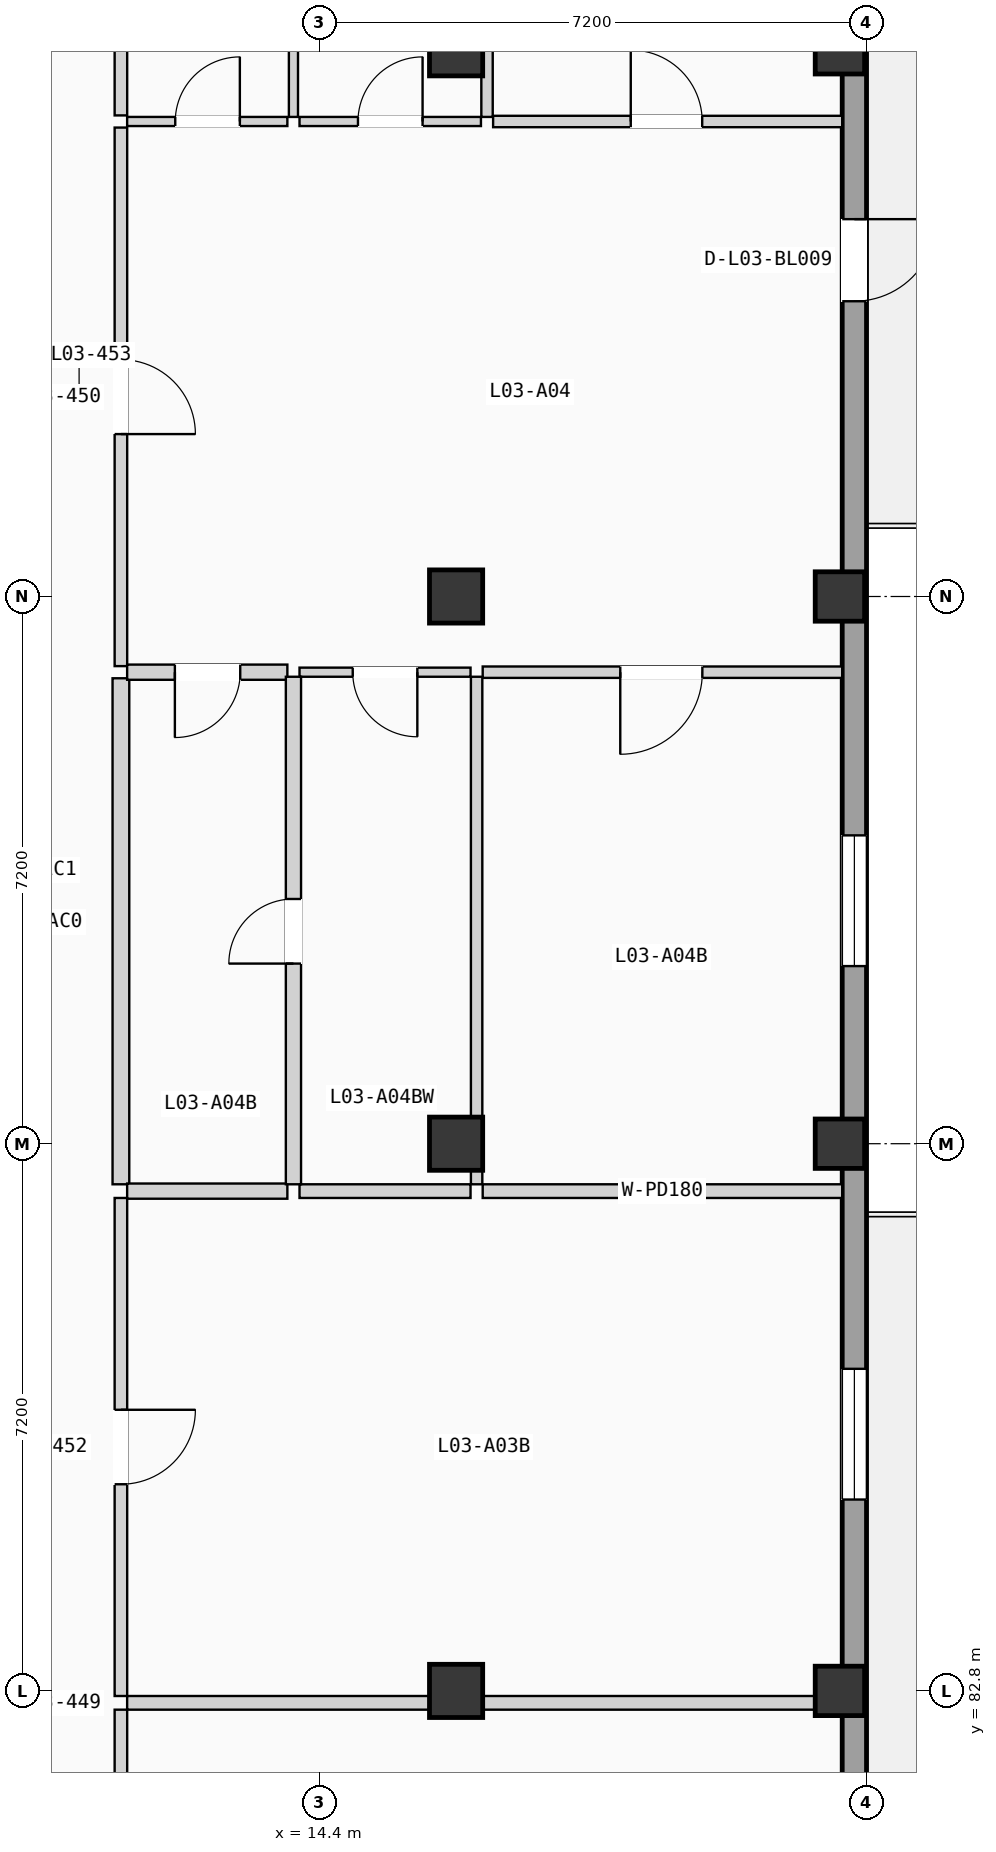
"""IFC4 building model, lengths in metres.
Left out: names, types, materials, properties, quantities, classifications, styles, units other than length and angle.
Written with IfcOpenShell. Run it as: python <this file> out.ifc"""

import sys

from ifc_helpers import new_model, si_unit, direction, frame, frame_2d, origin, origin_2d, place, context, subcontext, project, spatial, rectangle, extrude, element, fill, save


model = new_model("IFC4")
c1 = context("Model", 3, precision=1e-05, world=origin(), true_north=direction((0.0, 1.0)))
c2 = subcontext(c1, "Body", "Model", "MODEL_VIEW")
j1 = project(units=[si_unit("LENGTHUNIT", "METRE"), si_unit("PLANEANGLEUNIT", "RADIAN")], contexts=[c1])
p1 = place(None, origin())
s1 = spatial("IfcSite", under=j1, at=p1, CompositionType="ELEMENT")
p2 = place(p1, origin())
s2 = spatial("IfcBuilding", under=s1, at=p2, CompositionType="ELEMENT")
p3 = place(p2, frame((0.0, 0.0, 12.075)))
s3 = spatial("IfcBuildingStorey", under=s2, at=p3, CompositionType="ELEMENT", Elevation=12.075)
for number, where, z_axis, x_axis in (
    (1, (16.2, 82.8, 0.0), (0.0, 0.0, 1.0), (1.0, 0.0, 0.0)),
    (2, (16.2, 90.0, 0.0), (0.0, 0.0, 1.0), (1.0, 0.0, 0.0)),
    (3, (16.2, 97.2, 0.0), (0.0, 0.0, 1.0), (1.0, 0.0, 0.0)),
    (4, (16.2, 104.4, 0.0), (0.0, 0.0, 1.0), (1.0, 0.0, 0.0)),
):
    element("IfcColumn", number, at=place(p3, frame(where, z_axis=z_axis, x_axis=x_axis)), inside=s3, PredefinedType="COLUMN", context=c2, shape_type="SweptSolid", body=[
        extrude(rectangle(XDim=0.7, YDim=0.7, at=origin_2d()), origin(), (0.0, 0.0, 1.0), 3.15),
    ])
for number, where, z_axis, x_axis in (
    (5, (21.25, 82.8, 0.0), (0.0, 0.0, 1.0), (1.0, 0.0, 0.0)),
    (6, (21.25, 90.0, 0.0), (0.0, 0.0, 1.0), (1.0, 0.0, 0.0)),
    (7, (21.25, 97.2, 0.0), (0.0, 0.0, 1.0), (1.0, 0.0, 0.0)),
    (8, (21.25, 104.4, 0.0), (0.0, 0.0, 1.0), (1.0, 0.0, 0.0)),
):
    element("IfcColumn", number, at=place(p3, frame(where, z_axis=z_axis, x_axis=x_axis)), inside=s3, PredefinedType="COLUMN", context=c2, shape_type="SweptSolid", body=[
        extrude(rectangle(XDim=0.65, YDim=0.65, at=origin_2d()), origin(), (0.0, 0.0, 1.0), 3.15),
    ])
p4 = place(p3, frame((21.44, 68.72, 0.0), z_axis=(0.0, 0.0, 1.0), x_axis=(0.0, 1.0, 0.0)))
e9 = element("IfcWall", 9, at=p4, inside=s3, PredefinedType="SOLIDWALL", context=c2, shape_type="SweptSolid", body=[
    extrude(rectangle(XDim=49.76, YDim=0.32, at=frame_2d((24.88, 0.0))), origin(), (0.0, 0.0, 1.0), 2.89),
])
p5 = place(p4, frame((10.83, 0.0, 0.0)))
e10 = element("IfcOpeningElement", 10, at=p5, cuts=e9, PredefinedType="OPENING", context=c2, shape_type="SweptSolid", body=[
    extrude(rectangle(XDim=0.95, YDim=2.15, at=frame_2d((0.475, 1.075))), frame((0.0, 0.17, 0.0), z_axis=(0.0, -1.0, 0.0), x_axis=(1.0, 0.0, 0.0)), (0.0, 0.0, 1.0), 0.34),
])
p6 = place(p4, frame((16.598, 0.0, 0.9)))
e11 = element("IfcOpeningElement", 11, at=p6, cuts=e9, PredefinedType="OPENING", context=c2, shape_type="SweptSolid", body=[
    extrude(rectangle(XDim=1.72, YDim=1.2, at=frame_2d((0.86, 0.6))), frame((0.0, 0.17, 0.0), z_axis=(0.0, -1.0, 0.0), x_axis=(1.0, 0.0, 0.0)), (0.0, 0.0, 1.0), 0.34),
])
p7 = place(p4, frame((32.365, 0.0, 0.0)))
e12 = element("IfcOpeningElement", 12, at=p7, cuts=e9, PredefinedType="OPENING", context=c2, shape_type="SweptSolid", body=[
    extrude(rectangle(XDim=1.08, YDim=2.18, at=frame_2d((0.54, 1.09))), frame((0.0, 0.17, 0.0), z_axis=(0.0, -1.0, 0.0), x_axis=(1.0, 0.0, 0.0)), (0.0, 0.0, 1.0), 0.34),
])
p8 = place(p4, frame((23.617, 0.0, 0.855)))
e13 = element("IfcOpeningElement", 13, at=p8, cuts=e9, PredefinedType="OPENING", context=c2, shape_type="SweptSolid", body=[
    extrude(rectangle(XDim=1.72, YDim=1.35, at=frame_2d((0.86, 0.675))), frame((0.0, 0.17, 0.0), z_axis=(0.0, -1.0, 0.0), x_axis=(1.0, 0.0, 0.0)), (0.0, 0.0, 1.0), 0.34),
])
p9 = place(p4, frame((38.355, 0.0, 0.705)))
e14 = element("IfcOpeningElement", 14, at=p9, cuts=e9, PredefinedType="OPENING", context=c2, shape_type="SweptSolid", body=[
    extrude(rectangle(XDim=1.72, YDim=1.5, at=frame_2d((0.86, 0.75))), frame((0.0, 0.17, 0.0), z_axis=(0.0, -1.0, 0.0), x_axis=(1.0, 0.0, 0.0)), (0.0, 0.0, 1.0), 0.34),
])
p10 = place(p3, frame((11.79, 75.945, 0.0), z_axis=(0.0, 0.0, 1.0), x_axis=(0.0, 1.0, 0.0)))
e15 = element("IfcWall", 15, at=p10, inside=s3, PredefinedType="PARTITIONING", context=c2, shape_type="SweptSolid", body=[
    extrude(rectangle(XDim=6.608, YDim=0.165, at=frame_2d((3.304, 0.0))), origin(), (0.0, 0.0, 1.0), 2.87),
])
p11 = place(p10, frame((2.842, 0.0, 0.0)))
e16 = element("IfcOpeningElement", 16, at=p11, cuts=e15, PredefinedType="OPENING", context=c2, shape_type="SweptSolid", body=[
    extrude(rectangle(XDim=0.98, YDim=2.08, at=frame_2d((0.49, 1.04))), frame((0.0, 0.093, 0.0), z_axis=(0.0, -1.0, 0.0), x_axis=(1.0, 0.0, 0.0)), (0.0, 0.0, 1.0), 0.185),
])
p12 = place(p3, frame((11.79, 82.733, 0.0), z_axis=(0.0, 0.0, 1.0), x_axis=(0.0, 1.0, 0.0)))
e17 = element("IfcWall", 17, at=p12, inside=s3, PredefinedType="PARTITIONING", context=c2, shape_type="SweptSolid", body=[
    extrude(rectangle(XDim=6.553, YDim=0.165, at=frame_2d((3.276, 0.0))), origin(), (0.0, 0.0, 1.0), 2.87),
])
p13 = place(p12, frame((2.786, 0.0, 0.0)))
e18 = element("IfcOpeningElement", 18, at=p13, cuts=e17, PredefinedType="OPENING", context=c2, shape_type="SweptSolid", body=[
    extrude(rectangle(XDim=0.98, YDim=2.08, at=frame_2d((0.49, 1.04))), frame((0.0, 0.093, 0.0), z_axis=(0.0, -1.0, 0.0), x_axis=(1.0, 0.0, 0.0)), (0.0, 0.0, 1.0), 0.185),
])
p14 = place(p3, frame((11.79, 96.284, 0.0), z_axis=(0.0, 0.0, 1.0), x_axis=(0.0, 1.0, 0.0)))
e19 = element("IfcWall", 19, at=p14, inside=s3, PredefinedType="PARTITIONING", context=c2, shape_type="SweptSolid", body=[
    extrude(rectangle(XDim=7.086, YDim=0.165, at=frame_2d((3.543, 0.0))), origin(), (0.0, 0.0, 1.0), 2.87),
])
p15 = place(p14, frame((3.053, 0.0, 0.0)))
e20 = element("IfcOpeningElement", 20, at=p15, cuts=e19, PredefinedType="OPENING", context=c2, shape_type="SweptSolid", body=[
    extrude(rectangle(XDim=0.98, YDim=2.08, at=frame_2d((0.49, 1.04))), frame((0.0, 0.093, 0.0), z_axis=(0.0, -1.0, 0.0), x_axis=(1.0, 0.0, 0.0)), (0.0, 0.0, 1.0), 0.185),
])
p16 = place(p3, frame((11.79, 89.466, 0.0), z_axis=(0.0, 0.0, 1.0), x_axis=(0.0, 1.0, 0.0)))
e21 = element("IfcWall", 21, at=p16, inside=s3, PredefinedType="PLUMBINGWALL", context=c2, shape_type="SweptSolid", body=[
    extrude(rectangle(XDim=6.658, YDim=0.22, at=frame_2d((3.329, 0.0))), origin(), (0.0, 0.0, 1.0), 2.87),
])
p17 = place(p3, frame((11.79, 103.53, 0.0), z_axis=(0.0, 0.0, 1.0), x_axis=(0.0, 1.0, 0.0)))
e22 = element("IfcWall", 22, at=p17, inside=s3, PredefinedType="PARTITIONING", context=c2, shape_type="SweptSolid", body=[
    extrude(rectangle(XDim=7.67, YDim=0.165, at=frame_2d((3.835, 0.0))), origin(), (0.0, 0.0, 1.0), 2.87),
])
p18 = place(p3, frame((11.872, 82.643, 0.0), z_axis=(0.0, 0.0, 1.0), x_axis=(1.0, 0.0, 0.0)))
e23 = element("IfcWall", 23, at=p18, inside=s3, PredefinedType="PARTITIONING", context=c2, shape_type="SweptSolid", body=[
    extrude(rectangle(XDim=9.408, YDim=0.18, at=frame_2d((4.704, 0.0))), origin(), (0.0, 0.0, 1.0), 2.16),
])
p19 = place(p3, frame((11.872, 89.376, 0.0), z_axis=(0.0, 0.0, 1.0), x_axis=(1.0, 0.0, 0.0)))
e24 = element("IfcWall", 24, at=p19, inside=s3, PredefinedType="PLUMBINGWALL", context=c2, shape_type="SweptSolid", body=[
    extrude(rectangle(XDim=2.108, YDim=0.2, at=frame_2d((1.054, 0.0))), origin(), (0.0, 0.0, 1.0), 2.87),
])
p20 = place(p3, frame((16.55, 89.376, 0.0), z_axis=(0.0, 0.0, 1.0), x_axis=(1.0, 0.0, 0.0)))
e25 = element("IfcWall", 25, at=p20, inside=s3, PredefinedType="PARTITIONING", context=c2, shape_type="SweptSolid", body=[
    extrude(rectangle(XDim=4.73, YDim=0.18, at=frame_2d((2.365, 0.0))), origin(), (0.0, 0.0, 1.0), 2.87),
])
p21 = place(p3, frame((14.14, 89.376, 0.0), z_axis=(0.0, 0.0, 1.0), x_axis=(1.0, 0.0, 0.0)))
e26 = element("IfcWall", 26, at=p21, inside=s3, PredefinedType="PARTITIONING", context=c2, shape_type="SweptSolid", body=[
    extrude(rectangle(XDim=2.25, YDim=0.18, at=frame_2d((1.125, 0.0))), origin(), (0.0, 0.0, 1.0), 2.87),
])
p22 = place(p3, frame((11.872, 96.204, 0.0), z_axis=(0.0, 0.0, 1.0), x_axis=(1.0, 0.0, 0.0)))
e27 = element("IfcWall", 27, at=p22, inside=s3, PredefinedType="PLUMBINGWALL", context=c2, shape_type="SweptSolid", body=[
    extrude(rectangle(XDim=2.108, YDim=0.2, at=frame_2d((1.054, 0.0))), origin(), (0.0, 0.0, 1.0), 2.87),
])
p23 = place(p22, frame((0.628, 0.0, 0.0)))
e28 = element("IfcOpeningElement", 28, at=p23, cuts=e27, PredefinedType="OPENING", context=c2, shape_type="SweptSolid", body=[
    extrude(rectangle(XDim=0.86, YDim=2.0, at=frame_2d((0.43, 1.0))), frame((0.0, 0.11, 0.0), z_axis=(0.0, -1.0, 0.0), x_axis=(1.0, 0.0, 0.0)), (0.0, 0.0, 1.0), 0.22),
])
p24 = place(p3, frame((11.872, 103.45, 0.0), z_axis=(0.0, 0.0, 1.0), x_axis=(1.0, 0.0, 0.0)))
e29 = element("IfcWall", 29, at=p24, inside=s3, PredefinedType="PARTITIONING", context=c2, shape_type="SweptSolid", body=[
    extrude(rectangle(XDim=2.108, YDim=0.12, at=frame_2d((1.054, 0.0))), origin(), (0.0, 0.0, 1.0), 2.87),
])
p25 = place(p24, frame((0.633, 0.0, 0.0)))
e30 = element("IfcOpeningElement", 30, at=p25, cuts=e29, PredefinedType="OPENING", context=c2, shape_type="SweptSolid", body=[
    extrude(rectangle(XDim=0.85, YDim=2.01, at=frame_2d((0.425, 1.005))), frame((0.0, 0.07, 0.0), z_axis=(0.0, -1.0, 0.0), x_axis=(1.0, 0.0, 0.0)), (0.0, 0.0, 1.0), 0.14),
])
p26 = place(p3, frame((16.55, 96.204, 0.0), z_axis=(0.0, 0.0, 1.0), x_axis=(1.0, 0.0, 0.0)))
e31 = element("IfcWall", 31, at=p26, inside=s3, PredefinedType="PARTITIONING", context=c2, shape_type="SweptSolid", body=[
    extrude(rectangle(XDim=4.73, YDim=0.15, at=frame_2d((2.365, 0.0))), origin(), (0.0, 0.0, 1.0), 2.87),
])
p27 = place(p26, frame((1.81, 0.0, 0.0)))
e32 = element("IfcOpeningElement", 32, at=p27, cuts=e31, PredefinedType="OPENING", context=c2, shape_type="SweptSolid", body=[
    extrude(rectangle(XDim=1.08, YDim=2.1, at=frame_2d((0.54, 1.05))), frame((0.0, 0.085, 0.0), z_axis=(0.0, -1.0, 0.0), x_axis=(1.0, 0.0, 0.0)), (0.0, 0.0, 1.0), 0.17),
])
p28 = place(p3, frame((14.14, 96.204, 0.0), z_axis=(0.0, 0.0, 1.0), x_axis=(1.0, 0.0, 0.0)))
e33 = element("IfcWall", 33, at=p28, inside=s3, PredefinedType="PARTITIONING", context=c2, shape_type="SweptSolid", body=[
    extrude(rectangle(XDim=2.25, YDim=0.12, at=frame_2d((1.125, 0.0))), origin(), (0.0, 0.0, 1.0), 2.87),
])
p29 = place(p28, frame((0.7, 0.0, 0.0)))
e34 = element("IfcOpeningElement", 34, at=p29, cuts=e33, PredefinedType="OPENING", context=c2, shape_type="SweptSolid", body=[
    extrude(rectangle(XDim=0.85, YDim=2.01, at=frame_2d((0.425, 1.005))), frame((0.0, 0.07, 0.0), z_axis=(0.0, -1.0, 0.0), x_axis=(1.0, 0.0, 0.0)), (0.0, 0.0, 1.0), 0.14),
])
p30 = place(p3, frame((16.687, 103.45, 0.0), z_axis=(0.0, 0.0, 1.0), x_axis=(1.0, 0.0, 0.0)))
e35 = element("IfcWall", 35, at=p30, inside=s3, PredefinedType="PARTITIONING", context=c2, shape_type="SweptSolid", body=[
    extrude(rectangle(XDim=4.593, YDim=0.15, at=frame_2d((2.296, 0.0))), origin(), (0.0, 0.0, 1.0), 2.87),
])
p31 = place(p30, frame((1.811, 0.0, 0.0)))
e36 = element("IfcOpeningElement", 36, at=p31, cuts=e35, PredefinedType="OPENING", context=c2, shape_type="SweptSolid", body=[
    extrude(rectangle(XDim=0.94, YDim=2.06, at=frame_2d((0.47, 1.03))), frame((0.0, 0.085, 0.0), z_axis=(0.0, -1.0, 0.0), x_axis=(1.0, 0.0, 0.0)), (0.0, 0.0, 1.0), 0.17),
])
p32 = place(p3, frame((14.14, 103.45, 0.0), z_axis=(0.0, 0.0, 1.0), x_axis=(1.0, 0.0, 0.0)))
e37 = element("IfcWall", 37, at=p32, inside=s3, PredefinedType="PARTITIONING", context=c2, shape_type="SweptSolid", body=[
    extrude(rectangle(XDim=2.387, YDim=0.12, at=frame_2d((1.194, 0.0))), origin(), (0.0, 0.0, 1.0), 2.87),
])
p33 = place(p32, frame((0.769, 0.0, 0.0)))
e38 = element("IfcOpeningElement", 38, at=p33, cuts=e37, PredefinedType="OPENING", context=c2, shape_type="SweptSolid", body=[
    extrude(rectangle(XDim=0.85, YDim=2.01, at=frame_2d((0.425, 1.005))), frame((0.0, 0.07, 0.0), z_axis=(0.0, -1.0, 0.0), x_axis=(1.0, 0.0, 0.0)), (0.0, 0.0, 1.0), 0.14),
])
p34 = place(p3, frame((14.06, 89.466, 0.0), z_axis=(0.0, 0.0, 1.0), x_axis=(0.0, 1.0, 0.0)))
e39 = element("IfcWall", 39, at=p34, inside=s3, PredefinedType="PLUMBINGWALL", context=c2, shape_type="SweptSolid", body=[
    extrude(rectangle(XDim=6.678, YDim=0.2, at=frame_2d((3.339, 0.0))), origin(), (0.0, 0.0, 1.0), 2.87),
])
p35 = place(p34, frame((2.904, 0.0, 0.0)))
e40 = element("IfcOpeningElement", 40, at=p35, cuts=e39, PredefinedType="OPENING", context=c2, shape_type="SweptSolid", body=[
    extrude(rectangle(XDim=0.85, YDim=2.01, at=frame_2d((0.425, 1.005))), frame((0.0, 0.11, 0.0), z_axis=(0.0, -1.0, 0.0), x_axis=(1.0, 0.0, 0.0)), (0.0, 0.0, 1.0), 0.22),
])
p36 = place(p3, frame((14.06, 103.51, 0.0), z_axis=(0.0, 0.0, 1.0), x_axis=(0.0, 1.0, 0.0)))
e41 = element("IfcWall", 41, at=p36, inside=s3, PredefinedType="PARTITIONING", context=c2, shape_type="SweptSolid", body=[
    extrude(rectangle(XDim=7.69, YDim=0.12, at=frame_2d((3.845, 0.0))), origin(), (0.0, 0.0, 1.0), 2.87),
])
p37 = place(p3, frame((16.47, 89.466, 0.0), z_axis=(0.0, 0.0, 1.0), x_axis=(0.0, 1.0, 0.0)))
e42 = element("IfcWall", 42, at=p37, inside=s3, PredefinedType="PARTITIONING", context=c2, shape_type="SweptSolid", body=[
    extrude(rectangle(XDim=6.678, YDim=0.15, at=frame_2d((3.339, 0.0))), origin(), (0.0, 0.0, 1.0), 2.87),
])
p38 = place(p3, frame((16.607, 103.51, 0.0), z_axis=(0.0, 0.0, 1.0), x_axis=(0.0, 1.0, 0.0)))
e43 = element("IfcWall", 43, at=p38, inside=s3, PredefinedType="PARTITIONING", context=c2, shape_type="SweptSolid", body=[
    extrude(rectangle(XDim=7.69, YDim=0.15, at=frame_2d((3.845, 0.0))), origin(), (0.0, 0.0, 1.0), 2.87),
])
p39 = place(p6, origin())
e44 = element("IfcWindow", 44, at=p39, inside=s3, PartitioningType="DOUBLE_PANEL_VERTICAL", PredefinedType="WINDOW", context=c2, shape_type="SweptSolid", body=[
    extrude(rectangle(XDim=1.72, YDim=1.2, at=frame_2d((0.86, 0.6))), frame((0.0, 0.03, 0.0), z_axis=(0.0, -1.0, 0.0), x_axis=(1.0, 0.0, 0.0)), (0.0, 0.0, 1.0), 0.06),
])
fill(e11, e44)
p40 = place(p7, frame((1.08, 0.0, 0.0), z_axis=(0.0, 0.0, 1.0), x_axis=(-1.0, 0.0, 0.0)))
e45 = element("IfcDoor", 45, at=p40, inside=s3, OperationType="SINGLE_SWING_RIGHT", PredefinedType="DOOR", context=c2, shape_type="SweptSolid", body=[
    extrude(rectangle(XDim=1.08, YDim=2.18, at=frame_2d((0.54, 1.09))), frame((0.0, 0.025, 0.0), z_axis=(0.0, -1.0, 0.0), x_axis=(1.0, 0.0, 0.0)), (0.0, 0.0, 1.0), 0.05),
])
fill(e12, e45)
p41 = place(p8, origin())
e46 = element("IfcWindow", 46, at=p41, inside=s3, PartitioningType="DOUBLE_PANEL_VERTICAL", PredefinedType="WINDOW", context=c2, shape_type="SweptSolid", body=[
    extrude(rectangle(XDim=1.72, YDim=1.35, at=frame_2d((0.86, 0.675))), frame((0.0, 0.03, 0.0), z_axis=(0.0, -1.0, 0.0), x_axis=(1.0, 0.0, 0.0)), (0.0, 0.0, 1.0), 0.06),
])
fill(e13, e46)
p42 = place(p13, frame((0.98, 0.0, 0.0), z_axis=(0.0, 0.0, 1.0), x_axis=(-1.0, 0.0, 0.0)))
e47 = element("IfcDoor", 47, at=p42, inside=s3, OperationType="SINGLE_SWING_RIGHT", PredefinedType="DOOR", context=c2, shape_type="SweptSolid", body=[
    extrude(rectangle(XDim=0.98, YDim=2.08, at=frame_2d((0.49, 1.04))), frame((0.0, 0.025, 0.0), z_axis=(0.0, -1.0, 0.0), x_axis=(1.0, 0.0, 0.0)), (0.0, 0.0, 1.0), 0.05),
])
fill(e18, e47)
p43 = place(p15, frame((0.98, 0.0, 0.0), z_axis=(0.0, 0.0, 1.0), x_axis=(-1.0, 0.0, 0.0)))
e48 = element("IfcDoor", 48, at=p43, inside=s3, OperationType="SINGLE_SWING_LEFT", PredefinedType="DOOR", context=c2, shape_type="SweptSolid", body=[
    extrude(rectangle(XDim=0.98, YDim=2.08, at=frame_2d((0.49, 1.04))), frame((0.0, 0.025, 0.0), z_axis=(0.0, -1.0, 0.0), x_axis=(1.0, 0.0, 0.0)), (0.0, 0.0, 1.0), 0.05),
])
fill(e20, e48)
p44 = place(p23, frame((0.86, 0.0, 0.0), z_axis=(0.0, 0.0, 1.0), x_axis=(-1.0, 0.0, 0.0)))
e49 = element("IfcDoor", 49, at=p44, inside=s3, OperationType="SINGLE_SWING_LEFT", PredefinedType="DOOR", context=c2, shape_type="SweptSolid", body=[
    extrude(rectangle(XDim=0.86, YDim=2.0, at=frame_2d((0.43, 1.0))), frame((0.0, 0.025, 0.0), z_axis=(0.0, -1.0, 0.0), x_axis=(1.0, 0.0, 0.0)), (0.0, 0.0, 1.0), 0.05),
])
fill(e28, e49)
p45 = place(p25, origin())
e50 = element("IfcDoor", 50, at=p45, inside=s3, OperationType="SINGLE_SWING_RIGHT", PredefinedType="DOOR", context=c2, shape_type="SweptSolid", body=[
    extrude(rectangle(XDim=0.85, YDim=2.01, at=frame_2d((0.425, 1.005))), frame((0.0, 0.025, 0.0), z_axis=(0.0, -1.0, 0.0), x_axis=(1.0, 0.0, 0.0)), (0.0, 0.0, 1.0), 0.05),
])
fill(e30, e50)
p46 = place(p27, frame((1.08, 0.0, 0.0), z_axis=(0.0, 0.0, 1.0), x_axis=(-1.0, 0.0, 0.0)))
e51 = element("IfcDoor", 51, at=p46, inside=s3, OperationType="SINGLE_SWING_LEFT", PredefinedType="DOOR", context=c2, shape_type="SweptSolid", body=[
    extrude(rectangle(XDim=1.08, YDim=2.1, at=frame_2d((0.54, 1.05))), frame((0.0, 0.025, 0.0), z_axis=(0.0, -1.0, 0.0), x_axis=(1.0, 0.0, 0.0)), (0.0, 0.0, 1.0), 0.05),
])
fill(e32, e51)
p47 = place(p29, frame((0.85, 0.0, 0.0), z_axis=(0.0, 0.0, 1.0), x_axis=(-1.0, 0.0, 0.0)))
e52 = element("IfcDoor", 52, at=p47, inside=s3, OperationType="SINGLE_SWING_RIGHT", PredefinedType="DOOR", context=c2, shape_type="SweptSolid", body=[
    extrude(rectangle(XDim=0.85, YDim=2.01, at=frame_2d((0.425, 1.005))), frame((0.0, 0.025, 0.0), z_axis=(0.0, -1.0, 0.0), x_axis=(1.0, 0.0, 0.0)), (0.0, 0.0, 1.0), 0.05),
])
fill(e34, e52)
p48 = place(p31, origin())
e53 = element("IfcDoor", 53, at=p48, inside=s3, OperationType="SINGLE_SWING_LEFT", PredefinedType="DOOR", context=c2, shape_type="SweptSolid", body=[
    extrude(rectangle(XDim=0.94, YDim=2.06, at=frame_2d((0.47, 1.03))), frame((0.0, 0.025, 0.0), z_axis=(0.0, -1.0, 0.0), x_axis=(1.0, 0.0, 0.0)), (0.0, 0.0, 1.0), 0.05),
])
fill(e36, e53)
p49 = place(p33, origin())
e54 = element("IfcDoor", 54, at=p49, inside=s3, OperationType="SINGLE_SWING_RIGHT", PredefinedType="DOOR", context=c2, shape_type="SweptSolid", body=[
    extrude(rectangle(XDim=0.85, YDim=2.01, at=frame_2d((0.425, 1.005))), frame((0.0, 0.025, 0.0), z_axis=(0.0, -1.0, 0.0), x_axis=(1.0, 0.0, 0.0)), (0.0, 0.0, 1.0), 0.05),
])
fill(e38, e54)
p50 = place(p35, origin())
e55 = element("IfcDoor", 55, at=p50, inside=s3, OperationType="SINGLE_SWING_LEFT", PredefinedType="DOOR", context=c2, shape_type="SweptSolid", body=[
    extrude(rectangle(XDim=0.85, YDim=2.01, at=frame_2d((0.425, 1.005))), frame((0.0, 0.025, 0.0), z_axis=(0.0, -1.0, 0.0), x_axis=(1.0, 0.0, 0.0)), (0.0, 0.0, 1.0), 0.05),
])
fill(e40, e55)
save(model, sys.argv[1])
